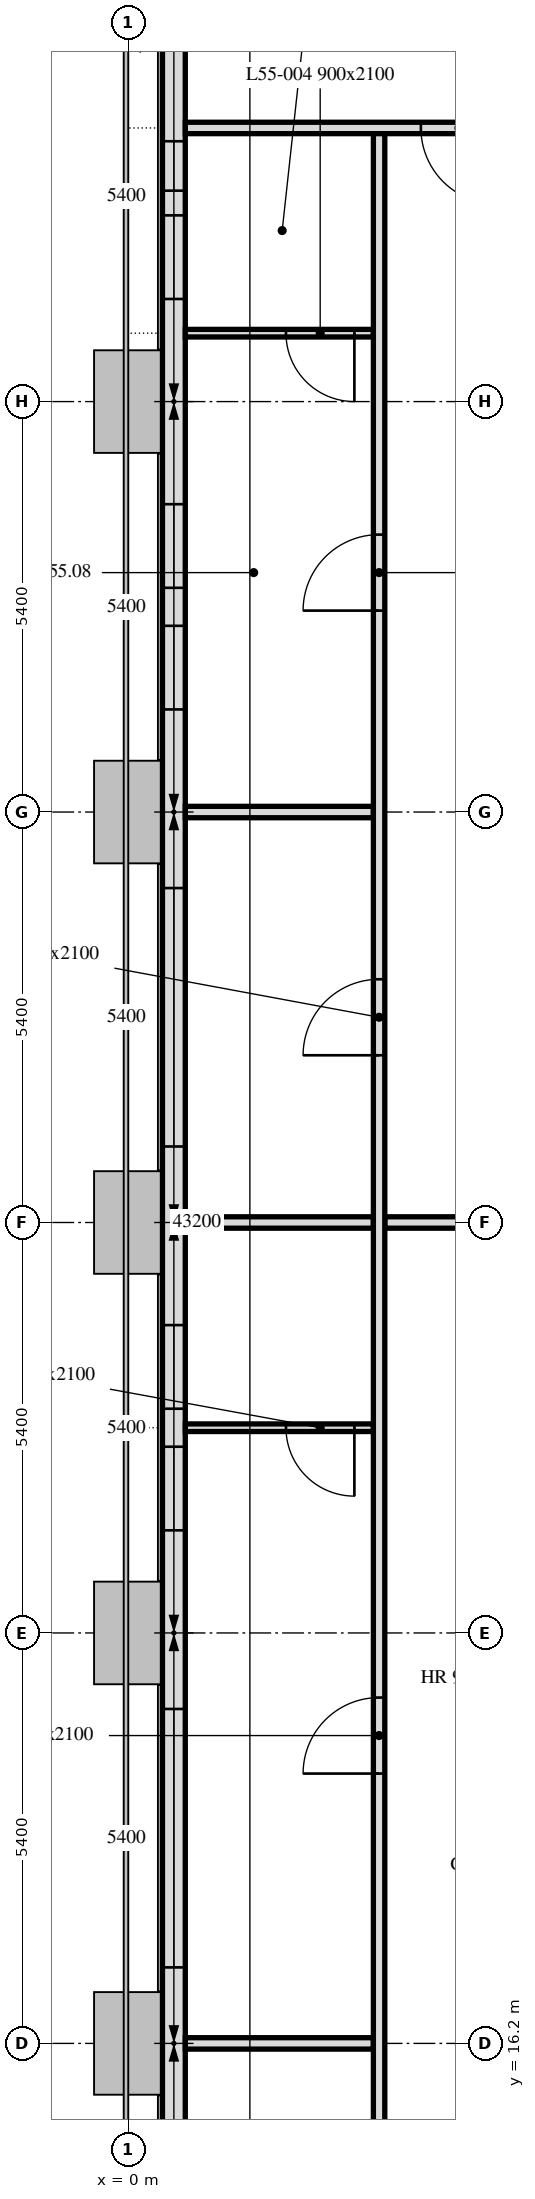
"""IFC4 building model, lengths in metres.
Left out: names, types, materials, properties, quantities, classifications, styles, units other than length and angle.
Written with IfcOpenShell. Run it as: python <this file> out.ifc"""

import sys

from ifc_helpers import new_model, si_unit, direction, frame, frame_2d, origin, place, context, subcontext, project, spatial, rectangle, extrude, element, fill, save


model = new_model("IFC4")
c1 = context("Model", 3, precision=1e-05, world=origin(), true_north=direction((0.0, 1.0)))
c2 = subcontext(c1, "Body", "Model", "MODEL_VIEW")
j1 = project(units=[si_unit("LENGTHUNIT", "METRE"), si_unit("PLANEANGLEUNIT", "RADIAN")], contexts=[c1])
p1 = place(None, origin())
s1 = spatial("IfcSite", under=j1, at=p1, CompositionType="ELEMENT")
p2 = place(p1, origin())
s2 = spatial("IfcBuilding", under=s1, at=p2, CompositionType="ELEMENT")
p3 = place(p2, frame((0.0, 0.0, 220.3)))
s3 = spatial("IfcBuildingStorey", under=s2, at=p3, CompositionType="ELEMENT", Elevation=220.3)
p4 = place(p3, frame((0.6, 43.014, 0.0), z_axis=(0.0, 0.0, 1.0), x_axis=(0.0, -1.0, 0.0)))
e1 = element("IfcWall", 1, at=p4, inside=s3, PredefinedType="SOLIDWALL", context=c2, shape_type="SweptSolid", body=[
    extrude(rectangle(XDim=32.027, YDim=0.3, at=frame_2d((16.014, 0.0))), origin(), (0.0, 0.0, 1.0), 3.0),
])
p5 = place(p4, frame((1.789, 0.0, 0.9)))
e2 = element("IfcOpeningElement", 2, at=p5, cuts=e1, PredefinedType="OPENING", context=c2, shape_type="SweptSolid", body=[
    extrude(rectangle(XDim=0.65, YDim=1.7, at=frame_2d((0.325, 0.85))), frame((0.0, 0.16, 0.0), z_axis=(0.0, -1.0, 0.0), x_axis=(1.0, 0.0, 0.0)), (0.0, 0.0, 1.0), 0.32),
])
p6 = place(p4, frame((2.764, 0.0, 0.9)))
e3 = element("IfcOpeningElement", 3, at=p6, cuts=e1, PredefinedType="OPENING", context=c2, shape_type="SweptSolid", body=[
    extrude(rectangle(XDim=1.1, YDim=1.7, at=frame_2d((0.55, 0.85))), frame((0.0, 0.16, 0.0), z_axis=(0.0, -1.0, 0.0), x_axis=(1.0, 0.0, 0.0)), (0.0, 0.0, 1.0), 0.32),
])
p7 = place(p4, frame((6.564, 0.0, 0.9)))
e4 = element("IfcOpeningElement", 4, at=p7, cuts=e1, PredefinedType="OPENING", context=c2, shape_type="SweptSolid", body=[
    extrude(rectangle(XDim=1.1, YDim=1.7, at=frame_2d((0.55, 0.85))), frame((0.0, 0.16, 0.0), z_axis=(0.0, -1.0, 0.0), x_axis=(1.0, 0.0, 0.0)), (0.0, 0.0, 1.0), 0.32),
])
p8 = place(p4, frame((8.164, 0.0, 0.9)))
e5 = element("IfcOpeningElement", 5, at=p8, cuts=e1, PredefinedType="OPENING", context=c2, shape_type="SweptSolid", body=[
    extrude(rectangle(XDim=1.1, YDim=1.7, at=frame_2d((0.55, 0.85))), frame((0.0, 0.16, 0.0), z_axis=(0.0, -1.0, 0.0), x_axis=(1.0, 0.0, 0.0)), (0.0, 0.0, 1.0), 0.32),
])
p9 = place(p4, frame((11.614, 0.0, 0.9)))
e6 = element("IfcOpeningElement", 6, at=p9, cuts=e1, PredefinedType="OPENING", context=c2, shape_type="SweptSolid", body=[
    extrude(rectangle(XDim=3.4, YDim=1.7, at=frame_2d((1.7, 0.85))), frame((0.0, 0.16, 0.0), z_axis=(0.0, -1.0, 0.0), x_axis=(1.0, 0.0, 0.0)), (0.0, 0.0, 1.0), 0.32),
])
p10 = place(p4, frame((17.364, 0.0, 0.9)))
e7 = element("IfcOpeningElement", 7, at=p10, cuts=e1, PredefinedType="OPENING", context=c2, shape_type="SweptSolid", body=[
    extrude(rectangle(XDim=1.1, YDim=1.7, at=frame_2d((0.55, 0.85))), frame((0.0, 0.16, 0.0), z_axis=(0.0, -1.0, 0.0), x_axis=(1.0, 0.0, 0.0)), (0.0, 0.0, 1.0), 0.32),
])
p11 = place(p4, frame((18.964, 0.0, 0.9)))
e8 = element("IfcOpeningElement", 8, at=p11, cuts=e1, PredefinedType="OPENING", context=c2, shape_type="SweptSolid", body=[
    extrude(rectangle(XDim=1.1, YDim=1.7, at=frame_2d((0.55, 0.85))), frame((0.0, 0.16, 0.0), z_axis=(0.0, -1.0, 0.0), x_axis=(1.0, 0.0, 0.0)), (0.0, 0.0, 1.0), 0.32),
])
p12 = place(p4, frame((22.414, 0.0, 0.9)))
e9 = element("IfcOpeningElement", 9, at=p12, cuts=e1, PredefinedType="OPENING", context=c2, shape_type="SweptSolid", body=[
    extrude(rectangle(XDim=3.4, YDim=1.7, at=frame_2d((1.7, 0.85))), frame((0.0, 0.16, 0.0), z_axis=(0.0, -1.0, 0.0), x_axis=(1.0, 0.0, 0.0)), (0.0, 0.0, 1.0), 0.32),
])
p13 = place(p4, frame((28.164, 0.0, 0.9)))
e10 = element("IfcOpeningElement", 10, at=p13, cuts=e1, PredefinedType="OPENING", context=c2, shape_type="SweptSolid", body=[
    extrude(rectangle(XDim=1.1, YDim=1.7, at=frame_2d((0.55, 0.85))), frame((0.0, 0.16, 0.0), z_axis=(0.0, -1.0, 0.0), x_axis=(1.0, 0.0, 0.0)), (0.0, 0.0, 1.0), 0.32),
])
p14 = place(p4, frame((29.764, 0.0, 0.9)))
e11 = element("IfcOpeningElement", 11, at=p14, cuts=e1, PredefinedType="OPENING", context=c2, shape_type="SweptSolid", body=[
    extrude(rectangle(XDim=1.1, YDim=1.7, at=frame_2d((0.55, 0.85))), frame((0.0, 0.16, 0.0), z_axis=(0.0, -1.0, 0.0), x_axis=(1.0, 0.0, 0.0)), (0.0, 0.0, 1.0), 0.32),
])
p15 = place(p3, frame((0.751, 32.4, 0.0), z_axis=(0.0, 0.0, 1.0), x_axis=(1.0, 0.0, 0.0)))
e12 = element("IfcWall", 12, at=p15, inside=s3, PredefinedType="PARTITIONING", context=c2, shape_type="SweptSolid", body=[
    extrude(rectangle(XDim=2.474, YDim=0.15, at=frame_2d((1.237, 0.0))), origin(), (0.0, 0.0, 1.0), 2.4),
])
p16 = place(p3, frame((3.225, 38.7, 0.0), z_axis=(0.0, 0.0, 1.0), x_axis=(-1.0, 0.0, 0.0)))
e13 = element("IfcWall", 13, at=p16, inside=s3, PredefinedType="PARTITIONING", context=c2, shape_type="SweptSolid", body=[
    extrude(rectangle(XDim=2.474, YDim=0.1, at=frame_2d((1.237, 0.0))), origin(), (0.0, 0.0, 1.0), 3.0),
])
p17 = place(p16, frame((0.25, 0.0, 0.0)))
e14 = element("IfcOpeningElement", 14, at=p17, cuts=e13, PredefinedType="OPENING", context=c2, shape_type="SweptSolid", body=[
    extrude(rectangle(XDim=0.9, YDim=2.1, at=frame_2d((0.45, 1.05))), frame((0.0, 0.05, 0.0), z_axis=(0.0, -1.0, 0.0), x_axis=(1.0, 0.0, 0.0)), (0.0, 0.0, 1.0), 0.1),
])
p18 = place(p3, frame((42.449, 41.4, 0.0), z_axis=(0.0, 0.0, 1.0), x_axis=(-1.0, 0.0, 0.0)))
e15 = element("IfcWall", 15, at=p18, inside=s3, PredefinedType="PARTITIONING", context=c2, shape_type="SweptSolid", body=[
    extrude(rectangle(XDim=41.698, YDim=0.15, at=frame_2d((20.849, 0.0))), origin(), (0.0, 0.0, 1.0), 2.4),
])
p19 = place(p18, frame((1.449, 0.0, 0.0)))
e16 = element("IfcOpeningElement", 16, at=p19, cuts=e15, PredefinedType="OPENING", context=c2, shape_type="SweptSolid", body=[
    extrude(rectangle(XDim=1.0, YDim=2.1, at=frame_2d((0.5, 1.05))), frame((0.0, 0.075, 0.0), z_axis=(0.0, -1.0, 0.0), x_axis=(1.0, 0.0, 0.0)), (0.0, 0.0, 1.0), 0.15),
])
p20 = place(p18, frame((29.249, 0.0, 0.0)))
e17 = element("IfcOpeningElement", 17, at=p20, cuts=e15, PredefinedType="OPENING", context=c2, shape_type="SweptSolid", body=[
    extrude(rectangle(XDim=1.0, YDim=2.1, at=frame_2d((0.5, 1.05))), frame((0.0, 0.075, 0.0), z_axis=(0.0, -1.0, 0.0), x_axis=(1.0, 0.0, 0.0)), (0.0, 0.0, 1.0), 0.15),
])
p21 = place(p18, frame((37.599, 0.0, 0.0)))
e18 = element("IfcOpeningElement", 18, at=p21, cuts=e15, PredefinedType="OPENING", context=c2, shape_type="SweptSolid", body=[
    extrude(rectangle(XDim=1.0, YDim=2.1, at=frame_2d((0.5, 1.05))), frame((0.0, 0.075, 0.0), z_axis=(0.0, -1.0, 0.0), x_axis=(1.0, 0.0, 0.0)), (0.0, 0.0, 1.0), 0.15),
])
p22 = place(p18, frame((17.649, 0.0, 0.0)))
e19 = element("IfcOpeningElement", 19, at=p22, cuts=e15, PredefinedType="OPENING", context=c2, shape_type="SweptSolid", body=[
    extrude(rectangle(XDim=1.0, YDim=2.1, at=frame_2d((0.5, 1.05))), frame((0.0, 0.075, 0.0), z_axis=(0.0, -1.0, 0.0), x_axis=(1.0, 0.0, 0.0)), (0.0, 0.0, 1.0), 0.15),
])
p23 = place(p3, frame((0.751, 27.0, 0.0), z_axis=(0.0, 0.0, 1.0), x_axis=(1.0, 0.0, 0.0)))
e20 = element("IfcWall", 20, at=p23, inside=s3, PredefinedType="PARTITIONING", context=c2, shape_type="SweptSolid", body=[
    extrude(rectangle(XDim=2.474, YDim=0.15, at=frame_2d((1.237, 0.0))), origin(), (0.0, 0.0, 1.0), 2.4),
])
p24 = place(p3, frame((3.375, 27.0, 0.0), z_axis=(0.0, 0.0, 1.0), x_axis=(1.0, 0.0, 0.0)))
e21 = element("IfcWall", 21, at=p24, inside=s3, PredefinedType="PARTITIONING", context=c2, shape_type="SweptSolid", body=[
    extrude(rectangle(XDim=2.025, YDim=0.15, at=frame_2d((1.012, 0.0))), origin(), (0.0, 0.0, 1.0), 2.4),
])
p25 = place(p3, frame((3.225, 16.2, 0.0), z_axis=(0.0, 0.0, 1.0), x_axis=(-1.0, 0.0, 0.0)))
e22 = element("IfcWall", 22, at=p25, inside=s3, PredefinedType="PARTITIONING", context=c2, shape_type="SweptSolid", body=[
    extrude(rectangle(XDim=2.474, YDim=0.15, at=frame_2d((1.237, 0.0))), origin(), (0.0, 0.0, 1.0), 2.4),
])
p26 = place(p3, frame((3.225, 24.3, 0.0), z_axis=(0.0, 0.0, 1.0), x_axis=(-1.0, 0.0, 0.0)))
e23 = element("IfcWall", 23, at=p26, inside=s3, PredefinedType="PARTITIONING", context=c2, shape_type="SweptSolid", body=[
    extrude(rectangle(XDim=2.474, YDim=0.1, at=frame_2d((1.237, 0.0))), origin(), (0.0, 0.0, 1.0), 3.0),
])
p27 = place(p26, frame((0.25, 0.0, 0.0)))
e24 = element("IfcOpeningElement", 24, at=p27, cuts=e23, PredefinedType="OPENING", context=c2, shape_type="SweptSolid", body=[
    extrude(rectangle(XDim=0.9, YDim=2.1, at=frame_2d((0.45, 1.05))), frame((0.0, 0.05, 0.0), z_axis=(0.0, -1.0, 0.0), x_axis=(1.0, 0.0, 0.0)), (0.0, 0.0, 1.0), 0.1),
])
p28 = place(p3, frame((3.3, 11.325, 0.0), z_axis=(0.0, 0.0, 1.0), x_axis=(0.0, 1.0, 0.0)))
e25 = element("IfcWall", 25, at=p28, inside=s3, PredefinedType="PARTITIONING", context=c2, shape_type="SweptSolid", body=[
    extrude(rectangle(XDim=30.0, YDim=0.15, at=frame_2d((15.0, 0.0))), origin(), (0.0, 0.0, 1.0), 2.4),
])
p29 = place(p28, frame((17.875, 0.0, 0.0)))
e26 = element("IfcOpeningElement", 26, at=p29, cuts=e25, PredefinedType="OPENING", context=c2, shape_type="SweptSolid", body=[
    extrude(rectangle(XDim=1.0, YDim=2.1, at=frame_2d((0.5, 1.05))), frame((0.0, 0.075, 0.0), z_axis=(0.0, -1.0, 0.0), x_axis=(1.0, 0.0, 0.0)), (0.0, 0.0, 1.0), 0.15),
])
p30 = place(p28, frame((1.9, 0.0, 0.0)))
e27 = element("IfcOpeningElement", 27, at=p30, cuts=e25, PredefinedType="OPENING", context=c2, shape_type="SweptSolid", body=[
    extrude(rectangle(XDim=1.0, YDim=2.1, at=frame_2d((0.5, 1.05))), frame((0.0, 0.075, 0.0), z_axis=(0.0, -1.0, 0.0), x_axis=(1.0, 0.0, 0.0)), (0.0, 0.0, 1.0), 0.15),
])
p31 = place(p28, frame((23.725, 0.0, 0.0)))
e28 = element("IfcOpeningElement", 28, at=p31, cuts=e25, PredefinedType="OPENING", context=c2, shape_type="SweptSolid", body=[
    extrude(rectangle(XDim=1.0, YDim=2.1, at=frame_2d((0.5, 1.05))), frame((0.0, 0.075, 0.0), z_axis=(0.0, -1.0, 0.0), x_axis=(1.0, 0.0, 0.0)), (0.0, 0.0, 1.0), 0.15),
])
p32 = place(p28, frame((8.425, 0.0, 0.0)))
e29 = element("IfcOpeningElement", 29, at=p32, cuts=e25, PredefinedType="OPENING", context=c2, shape_type="SweptSolid", body=[
    extrude(rectangle(XDim=1.0, YDim=2.1, at=frame_2d((0.5, 1.05))), frame((0.0, 0.075, 0.0), z_axis=(0.0, -1.0, 0.0), x_axis=(1.0, 0.0, 0.0)), (0.0, 0.0, 1.0), 0.15),
])
p33 = place(p5, origin())
e30 = element("IfcWindow", 30, at=p33, inside=s3, PartitioningType="SINGLE_PANEL", PredefinedType="WINDOW", context=c2, shape_type="SweptSolid", body=[
    extrude(rectangle(XDim=0.65, YDim=1.7, at=frame_2d((0.325, 0.85))), frame((0.0, 0.03, 0.0), z_axis=(0.0, -1.0, 0.0), x_axis=(1.0, 0.0, 0.0)), (0.0, 0.0, 1.0), 0.06),
])
fill(e2, e30)
p34 = place(p6, origin())
e31 = element("IfcWindow", 31, at=p34, inside=s3, PartitioningType="SINGLE_PANEL", PredefinedType="WINDOW", context=c2, shape_type="SweptSolid", body=[
    extrude(rectangle(XDim=1.1, YDim=1.7, at=frame_2d((0.55, 0.85))), frame((0.0, 0.03, 0.0), z_axis=(0.0, -1.0, 0.0), x_axis=(1.0, 0.0, 0.0)), (0.0, 0.0, 1.0), 0.06),
])
fill(e3, e31)
p35 = place(p7, origin())
e32 = element("IfcWindow", 32, at=p35, inside=s3, PartitioningType="SINGLE_PANEL", PredefinedType="WINDOW", context=c2, shape_type="SweptSolid", body=[
    extrude(rectangle(XDim=1.1, YDim=1.7, at=frame_2d((0.55, 0.85))), frame((0.0, 0.03, 0.0), z_axis=(0.0, -1.0, 0.0), x_axis=(1.0, 0.0, 0.0)), (0.0, 0.0, 1.0), 0.06),
])
fill(e4, e32)
p36 = place(p8, origin())
e33 = element("IfcWindow", 33, at=p36, inside=s3, PartitioningType="SINGLE_PANEL", PredefinedType="WINDOW", context=c2, shape_type="SweptSolid", body=[
    extrude(rectangle(XDim=1.1, YDim=1.7, at=frame_2d((0.55, 0.85))), frame((0.0, 0.03, 0.0), z_axis=(0.0, -1.0, 0.0), x_axis=(1.0, 0.0, 0.0)), (0.0, 0.0, 1.0), 0.06),
])
fill(e5, e33)
p37 = place(p9, origin())
e34 = element("IfcWindow", 34, at=p37, inside=s3, PartitioningType="SINGLE_PANEL", PredefinedType="WINDOW", context=c2, shape_type="SweptSolid", body=[
    extrude(rectangle(XDim=3.4, YDim=1.7, at=frame_2d((1.7, 0.85))), frame((0.0, 0.03, 0.0), z_axis=(0.0, -1.0, 0.0), x_axis=(1.0, 0.0, 0.0)), (0.0, 0.0, 1.0), 0.06),
])
fill(e6, e34)
p38 = place(p10, origin())
e35 = element("IfcWindow", 35, at=p38, inside=s3, PartitioningType="SINGLE_PANEL", PredefinedType="WINDOW", context=c2, shape_type="SweptSolid", body=[
    extrude(rectangle(XDim=1.1, YDim=1.7, at=frame_2d((0.55, 0.85))), frame((0.0, 0.03, 0.0), z_axis=(0.0, -1.0, 0.0), x_axis=(1.0, 0.0, 0.0)), (0.0, 0.0, 1.0), 0.06),
])
fill(e7, e35)
p39 = place(p11, origin())
e36 = element("IfcWindow", 36, at=p39, inside=s3, PartitioningType="SINGLE_PANEL", PredefinedType="WINDOW", context=c2, shape_type="SweptSolid", body=[
    extrude(rectangle(XDim=1.1, YDim=1.7, at=frame_2d((0.55, 0.85))), frame((0.0, 0.03, 0.0), z_axis=(0.0, -1.0, 0.0), x_axis=(1.0, 0.0, 0.0)), (0.0, 0.0, 1.0), 0.06),
])
fill(e8, e36)
p40 = place(p12, origin())
e37 = element("IfcWindow", 37, at=p40, inside=s3, PartitioningType="SINGLE_PANEL", PredefinedType="WINDOW", context=c2, shape_type="SweptSolid", body=[
    extrude(rectangle(XDim=3.4, YDim=1.7, at=frame_2d((1.7, 0.85))), frame((0.0, 0.03, 0.0), z_axis=(0.0, -1.0, 0.0), x_axis=(1.0, 0.0, 0.0)), (0.0, 0.0, 1.0), 0.06),
])
fill(e9, e37)
p41 = place(p17, origin())
e38 = element("IfcDoor", 38, at=p41, inside=s3, OperationType="SINGLE_SWING_LEFT", PredefinedType="DOOR", context=c2, shape_type="SweptSolid", body=[
    extrude(rectangle(XDim=0.9, YDim=2.1, at=frame_2d((0.45, 1.05))), frame((0.0, 0.025, 0.0), z_axis=(0.0, -1.0, 0.0), x_axis=(1.0, 0.0, 0.0)), (0.0, 0.0, 1.0), 0.05),
])
fill(e14, e38)
p42 = place(p29, origin())
e39 = element("IfcDoor", 39, at=p42, inside=s3, OperationType="SINGLE_SWING_RIGHT", PredefinedType="DOOR", context=c2, shape_type="SweptSolid", body=[
    extrude(rectangle(XDim=1.0, YDim=2.1, at=frame_2d((0.5, 1.05))), frame((0.0, 0.025, 0.0), z_axis=(0.0, -1.0, 0.0), x_axis=(1.0, 0.0, 0.0)), (0.0, 0.0, 1.0), 0.05),
])
fill(e26, e39)
p43 = place(p27, origin())
e40 = element("IfcDoor", 40, at=p43, inside=s3, OperationType="SINGLE_SWING_RIGHT", PredefinedType="DOOR", context=c2, shape_type="SweptSolid", body=[
    extrude(rectangle(XDim=0.9, YDim=2.1, at=frame_2d((0.45, 1.05))), frame((0.0, 0.025, 0.0), z_axis=(0.0, -1.0, 0.0), x_axis=(1.0, 0.0, 0.0)), (0.0, 0.0, 1.0), 0.05),
])
fill(e24, e40)
p44 = place(p31, origin())
e41 = element("IfcDoor", 41, at=p44, inside=s3, OperationType="SINGLE_SWING_RIGHT", PredefinedType="DOOR", context=c2, shape_type="SweptSolid", body=[
    extrude(rectangle(XDim=1.0, YDim=2.1, at=frame_2d((0.5, 1.05))), frame((0.0, 0.025, 0.0), z_axis=(0.0, -1.0, 0.0), x_axis=(1.0, 0.0, 0.0)), (0.0, 0.0, 1.0), 0.05),
])
fill(e28, e41)
p45 = place(p21, origin())
e42 = element("IfcDoor", 42, at=p45, inside=s3, OperationType="SINGLE_SWING_RIGHT", PredefinedType="DOOR", context=c2, shape_type="SweptSolid", body=[
    extrude(rectangle(XDim=1.0, YDim=2.1, at=frame_2d((0.5, 1.05))), frame((0.0, 0.025, 0.0), z_axis=(0.0, -1.0, 0.0), x_axis=(1.0, 0.0, 0.0)), (0.0, 0.0, 1.0), 0.05),
])
fill(e18, e42)
p46 = place(p32, origin())
e43 = element("IfcDoor", 43, at=p46, inside=s3, OperationType="SINGLE_SWING_RIGHT", PredefinedType="DOOR", context=c2, shape_type="SweptSolid", body=[
    extrude(rectangle(XDim=1.0, YDim=2.1, at=frame_2d((0.5, 1.05))), frame((0.0, 0.025, 0.0), z_axis=(0.0, -1.0, 0.0), x_axis=(1.0, 0.0, 0.0)), (0.0, 0.0, 1.0), 0.05),
])
fill(e29, e43)
save(model, sys.argv[1])
